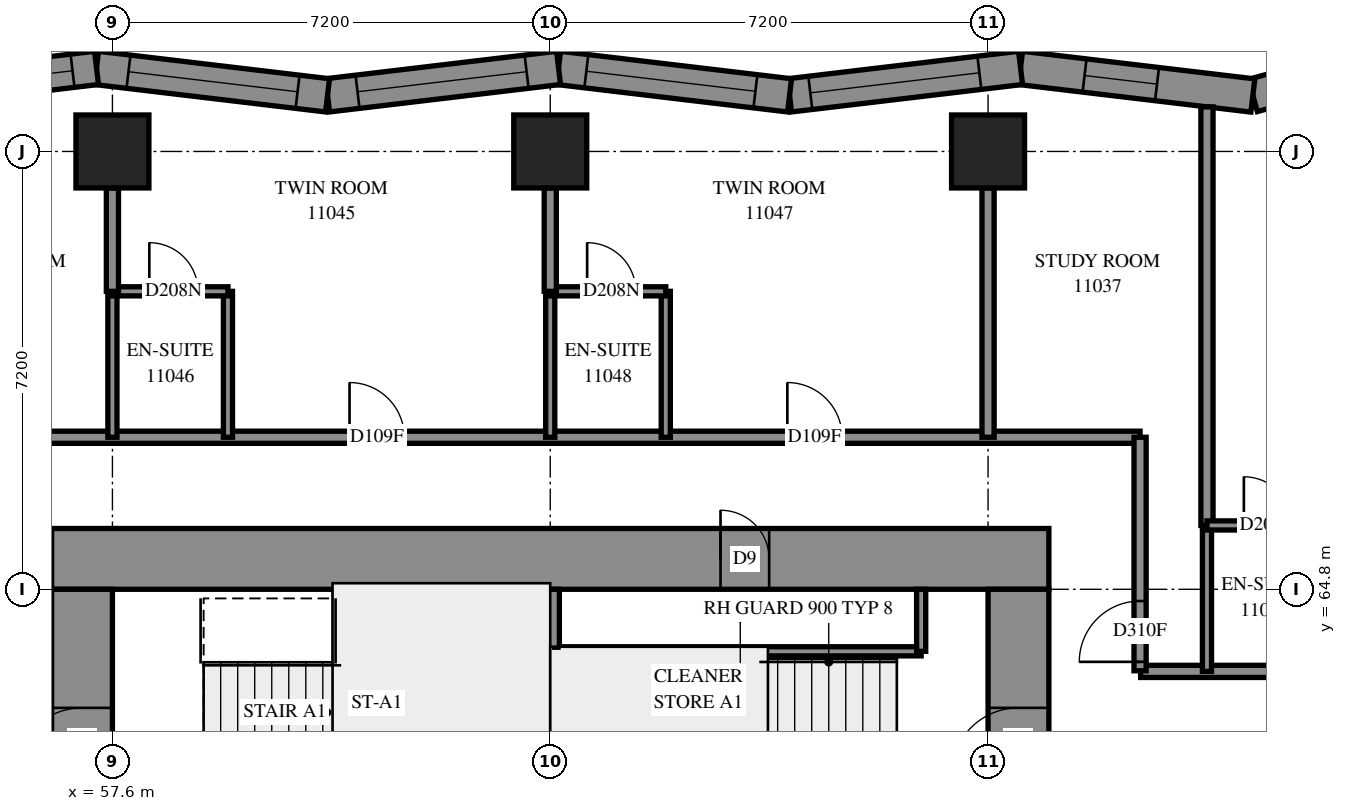
"""IFC4 building model, lengths in metres.
Left out: names, types, materials, properties, quantities, classifications, styles, units other than length and angle.
Written with IfcOpenShell. Run it as: python <this file> out.ifc"""

import sys

from ifc_helpers import new_model, si_unit, direction, frame, frame_2d, origin, origin_2d, place, context, subcontext, project, spatial, polyline, rectangle, outline, extrude, element, fill, save


model = new_model("IFC4")
c1 = context("Model", 3, precision=1e-05, world=origin(), true_north=direction((0.0, 1.0)))
c2 = subcontext(c1, "Body", "Model", "MODEL_VIEW")
j1 = project(units=[si_unit("LENGTHUNIT", "METRE"), si_unit("PLANEANGLEUNIT", "RADIAN")], contexts=[c1])
p1 = place(None, origin())
s1 = spatial("IfcSite", under=j1, at=p1, CompositionType="ELEMENT")
p2 = place(p1, origin())
s2 = spatial("IfcBuilding", under=s1, at=p2, CompositionType="ELEMENT")
p3 = place(p2, frame((0.0, 0.0, 44.0)))
s3 = spatial("IfcBuildingStorey", under=s2, at=p3, CompositionType="ELEMENT", Elevation=44.0)
for number, where, z_axis, x_axis in (
    (1, (57.6, 72.0, 0.0), (0.0, 0.0, 1.0), (1.0, 0.0, 0.0)),
    (2, (64.8, 72.0, 0.0), (0.0, 0.0, 1.0), (1.0, 0.0, 0.0)),
    (3, (72.0, 72.0, 0.0), (0.0, 0.0, 1.0), (1.0, 0.0, 0.0)),
):
    element("IfcColumn", number, at=place(p3, frame(where, z_axis=z_axis, x_axis=x_axis)), inside=s3, PredefinedType="COLUMN", context=c2, shape_type="SweptSolid", body=[
        extrude(rectangle(XDim=1.2, YDim=1.2, at=origin_2d()), origin(), (0.0, 0.0, 1.0), 3.1),
    ])
p4 = place(p3, frame((56.6, 65.3, -0.3), z_axis=(0.0, 0.0, 1.0), x_axis=(1.0, 0.0, 0.0)))
e4 = element("IfcWall", 4, at=p4, inside=s3, PredefinedType="SHEAR", context=c2, shape_type="SweptSolid", body=[
    extrude(rectangle(XDim=16.4, YDim=1.0, at=frame_2d((8.2, 0.0))), origin(), (0.0, 0.0, 1.0), 2.7),
])
p5 = place(p4, frame((11.0, 0.0, 0.3)))
e5 = element("IfcOpeningElement", 5, at=p5, cuts=e4, PredefinedType="OPENING", context=c2, shape_type="SweptSolid", body=[
    extrude(rectangle(XDim=0.8, YDim=2.1, at=frame_2d((0.4, 1.05))), frame((0.0, 0.51, 0.0), z_axis=(0.0, -1.0, 0.0), x_axis=(1.0, 0.0, 0.0)), (0.0, 0.0, 1.0), 1.02),
])
p6 = place(p3, frame((57.1, 50.4, -0.3), z_axis=(0.0, 0.0, 1.0), x_axis=(0.0, 1.0, 0.0)))
e6 = element("IfcWall", 6, at=p6, inside=s3, PredefinedType="SHEAR", context=c2, shape_type="SweptSolid", body=[
    extrude(rectangle(XDim=14.4, YDim=1.0, at=frame_2d((7.2, 0.0))), origin(), (0.0, 0.0, 1.0), 2.7),
])
p7 = place(p6, frame((4.55, 0.0, 0.3)))
e7 = element("IfcOpeningElement", 7, at=p7, cuts=e6, PredefinedType="OPENING", context=c2, shape_type="SweptSolid", body=[
    extrude(rectangle(XDim=1.1, YDim=2.1, at=frame_2d((0.55, 1.05))), frame((0.0, 0.51, 0.0), z_axis=(0.0, -1.0, 0.0), x_axis=(1.0, 0.0, 0.0)), (0.0, 0.0, 1.0), 1.02),
])
p8 = place(p6, frame((11.35, 0.0, 0.3)))
e8 = element("IfcOpeningElement", 8, at=p8, cuts=e6, PredefinedType="OPENING", context=c2, shape_type="SweptSolid", body=[
    extrude(rectangle(XDim=1.1, YDim=2.1, at=frame_2d((0.55, 1.05))), frame((0.0, 0.51, 0.0), z_axis=(0.0, -1.0, 0.0), x_axis=(1.0, 0.0, 0.0)), (0.0, 0.0, 1.0), 1.02),
])
p9 = place(p3, frame((72.5, 50.4, -0.3), z_axis=(0.0, 0.0, 1.0), x_axis=(0.0, 1.0, 0.0)))
e9 = element("IfcWall", 9, at=p9, inside=s3, PredefinedType="SHEAR", context=c2, shape_type="SweptSolid", body=[
    extrude(rectangle(XDim=14.4, YDim=1.0, at=frame_2d((7.2, 0.0))), origin(), (0.0, 0.0, 1.0), 2.7),
])
p10 = place(p9, frame((4.55, 0.0, 0.3)))
e10 = element("IfcOpeningElement", 10, at=p10, cuts=e9, PredefinedType="OPENING", context=c2, shape_type="SweptSolid", body=[
    extrude(rectangle(XDim=1.1, YDim=2.1, at=frame_2d((0.55, 1.05))), frame((0.0, 0.51, 0.0), z_axis=(0.0, -1.0, 0.0), x_axis=(1.0, 0.0, 0.0)), (0.0, 0.0, 1.0), 1.02),
])
p11 = place(p9, frame((11.35, 0.0, 0.3)))
e11 = element("IfcOpeningElement", 11, at=p11, cuts=e9, PredefinedType="OPENING", context=c2, shape_type="SweptSolid", body=[
    extrude(rectangle(XDim=1.1, YDim=2.1, at=frame_2d((0.55, 1.05))), frame((0.0, 0.51, 0.0), z_axis=(0.0, -1.0, 0.0), x_axis=(1.0, 0.0, 0.0)), (0.0, 0.0, 1.0), 1.02),
])
p12 = place(p3, frame((64.8, 60.6, 0.0), z_axis=(0.0, 0.0, 1.0), x_axis=(0.0, 1.0, 0.0)))
e12 = element("IfcWall", 12, at=p12, inside=s3, PredefinedType="SOLIDWALL", context=c2, shape_type="SweptSolid", body=[
    extrude(rectangle(XDim=4.2, YDim=0.3, at=frame_2d((2.1, 0.0))), origin(), (0.0, 0.0, 1.0), 3.1),
])
p13 = place(p3, frame((79.993, 73.927, 0.0), z_axis=(0.0, 0.0, 1.0), x_axis=(-0.9637951892, -0.2666436448, 0.0)))
e13 = element("IfcWall", 13, at=p13, inside=s3, PredefinedType="SOLIDWALL", context=c2, shape_type="SweptSolid", body=[
    extrude(outline(polyline([(-0.221, -0.275), (3.721, -0.275), (3.829, 0.275), (0.221, 0.275), (-0.221, -0.275)])), origin(), (0.0, 0.0, 1.0), 3.1),
])
p14 = place(p13, frame((1.599, 0.0, 0.5)))
e14 = element("IfcOpeningElement", 14, at=p14, cuts=e13, PredefinedType="OPENING", context=c2, shape_type="SweptSolid", body=[
    extrude(rectangle(XDim=1.2, YDim=2.45, at=frame_2d((0.6, 1.225))), frame((0.0, 0.285, 0.0), z_axis=(0.0, -1.0, 0.0), x_axis=(1.0, 0.0, 0.0)), (0.0, 0.0, 1.0), 0.57),
])
p15 = place(p3, frame((76.355, 72.921, 0.0), z_axis=(0.0, 0.0, 1.0), x_axis=(-0.9930244072, 0.1179089763, 0.0)))
e15 = element("IfcWall", 15, at=p15, inside=s3, PredefinedType="SOLIDWALL", context=c2, shape_type="SweptSolid", body=[
    extrude(outline(polyline([(0.054, -0.275), (3.88, -0.275), (3.814, 0.275), (-0.054, 0.275), (0.054, -0.275)])), origin(), (0.0, 0.0, 1.0), 3.1),
])
p16 = place(p15, frame((1.587, 0.0, 0.5)))
e16 = element("IfcOpeningElement", 16, at=p16, cuts=e15, PredefinedType="OPENING", context=c2, shape_type="SweptSolid", body=[
    extrude(rectangle(XDim=1.2, YDim=2.45, at=frame_2d((0.6, 1.225))), frame((0.0, 0.285, 0.0), z_axis=(0.0, -1.0, 0.0), x_axis=(1.0, 0.0, 0.0)), (0.0, 0.0, 1.0), 0.57),
])
p17 = place(p3, frame((72.534, 73.374, 0.0), z_axis=(0.0, 0.0, 1.0), x_axis=(-0.9930269402, -0.1178876415, 0.0)))
e17 = element("IfcWall", 17, at=p17, inside=s3, PredefinedType="SOLIDWALL", context=c2, shape_type="SweptSolid", body=[
    extrude(outline(polyline([(-0.033, -0.275), (3.793, -0.275), (3.858, 0.275), (0.033, 0.275), (-0.033, -0.275)])), origin(), (0.0, 0.0, 1.0), 3.1),
])
p18 = place(p17, frame((0.682, 0.0, 0.5)))
e18 = element("IfcOpeningElement", 18, at=p18, cuts=e17, PredefinedType="OPENING", context=c2, shape_type="SweptSolid", body=[
    extrude(rectangle(XDim=2.8, YDim=2.45, at=frame_2d((1.4, 1.225))), frame((0.0, 0.285, 0.0), z_axis=(0.0, -1.0, 0.0), x_axis=(1.0, 0.0, 0.0)), (0.0, 0.0, 1.0), 0.57),
])
p19 = place(p3, frame((68.736, 72.923, 0.0), z_axis=(0.0, 0.0, 1.0), x_axis=(-0.9930265769, 0.1178907016, 0.0)))
e19 = element("IfcWall", 19, at=p19, inside=s3, PredefinedType="SOLIDWALL", context=c2, shape_type="SweptSolid", body=[
    extrude(outline(polyline([(0.033, -0.275), (3.858, -0.275), (3.793, 0.275), (-0.033, 0.275), (0.033, -0.275)])), origin(), (0.0, 0.0, 1.0), 3.1),
])
p20 = place(p19, frame((0.565, 0.0, 0.5)))
e20 = element("IfcOpeningElement", 20, at=p20, cuts=e19, PredefinedType="OPENING", context=c2, shape_type="SweptSolid", body=[
    extrude(rectangle(XDim=2.8, YDim=2.45, at=frame_2d((1.4, 1.225))), frame((0.0, 0.285, 0.0), z_axis=(0.0, -1.0, 0.0), x_axis=(1.0, 0.0, 0.0)), (0.0, 0.0, 1.0), 0.57),
])
p21 = place(p3, frame((64.937, 73.374, 0.0), z_axis=(0.0, 0.0, 1.0), x_axis=(-0.9930269402, -0.1178876415, 0.0)))
e21 = element("IfcWall", 21, at=p21, inside=s3, PredefinedType="SOLIDWALL", context=c2, shape_type="SweptSolid", body=[
    extrude(outline(polyline([(-0.033, -0.275), (3.793, -0.275), (3.858, 0.275), (0.033, 0.275), (-0.033, -0.275)])), origin(), (0.0, 0.0, 1.0), 3.1),
])
p22 = place(p21, frame((0.529, 0.0, 0.5)))
e22 = element("IfcOpeningElement", 22, at=p22, cuts=e21, PredefinedType="OPENING", context=c2, shape_type="SweptSolid", body=[
    extrude(rectangle(XDim=2.8, YDim=2.45, at=frame_2d((1.4, 1.225))), frame((0.0, 0.285, 0.0), z_axis=(0.0, -1.0, 0.0), x_axis=(1.0, 0.0, 0.0)), (0.0, 0.0, 1.0), 0.57),
])
p23 = place(p3, frame((61.138, 72.923, 0.0), z_axis=(0.0, 0.0, 1.0), x_axis=(-0.9930269402, 0.1178876415, 0.0)))
e23 = element("IfcWall", 23, at=p23, inside=s3, PredefinedType="SOLIDWALL", context=c2, shape_type="SweptSolid", body=[
    extrude(outline(polyline([(0.033, -0.275), (3.858, -0.275), (3.793, 0.275), (-0.033, 0.275), (0.033, -0.275)])), origin(), (0.0, 0.0, 1.0), 3.1),
])
p24 = place(p23, frame((0.496, 0.0, 0.5)))
e24 = element("IfcOpeningElement", 24, at=p24, cuts=e23, PredefinedType="OPENING", context=c2, shape_type="SweptSolid", body=[
    extrude(rectangle(XDim=2.8, YDim=2.45, at=frame_2d((1.4, 1.225))), frame((0.0, 0.285, 0.0), z_axis=(0.0, -1.0, 0.0), x_axis=(1.0, 0.0, 0.0)), (0.0, 0.0, 1.0), 0.57),
])
p25 = place(p3, frame((57.339, 73.374, 0.0), z_axis=(0.0, 0.0, 1.0), x_axis=(-0.9930265769, -0.1178907016, 0.0)))
e25 = element("IfcWall", 25, at=p25, inside=s3, PredefinedType="SOLIDWALL", context=c2, shape_type="SweptSolid", body=[
    extrude(outline(polyline([(-0.033, -0.275), (3.793, -0.275), (3.858, 0.275), (0.033, 0.275), (-0.033, -0.275)])), origin(), (0.0, 0.0, 1.0), 3.1),
])
p26 = place(p25, frame((0.397, 0.0, 0.5)))
e26 = element("IfcOpeningElement", 26, at=p26, cuts=e25, PredefinedType="OPENING", context=c2, shape_type="SweptSolid", body=[
    extrude(rectangle(XDim=2.8, YDim=2.45, at=frame_2d((1.4, 1.225))), frame((0.0, 0.285, 0.0), z_axis=(0.0, -1.0, 0.0), x_axis=(1.0, 0.0, 0.0)), (0.0, 0.0, 1.0), 0.57),
])
p27 = place(p3, frame((64.95, 63.78, 0.0), z_axis=(0.0, 0.0, 1.0), x_axis=(1.0, 0.0, 0.0)))
e27 = element("IfcWall", 27, at=p27, inside=s3, PredefinedType="PARTITIONING", context=c2, shape_type="SweptSolid", body=[
    extrude(rectangle(XDim=5.95, YDim=0.15, at=frame_2d((2.975, 0.0))), origin(), (0.0, 0.0, 1.0), 3.1),
])
p28 = place(p3, frame((70.9, 63.78, 0.0), z_axis=(0.0, 0.0, 1.0), x_axis=(0.0, 1.0, 0.0)))
e28 = element("IfcWall", 28, at=p28, inside=s3, PredefinedType="PARTITIONING", context=c2, shape_type="SweptSolid", body=[
    extrude(rectangle(XDim=1.02, YDim=0.15, at=frame_2d((0.51, 0.0))), origin(), (0.0, 0.0, 1.0), 3.1),
])
p29 = place(p3, frame((55.1, 67.3, 0.0), z_axis=(0.0, 0.0, 1.0), x_axis=(1.0, 0.0, 0.0)))
e29 = element("IfcWall", 29, at=p29, inside=s3, PredefinedType="PARTITIONING", context=c2, shape_type="SweptSolid", body=[
    extrude(rectangle(XDim=19.4, YDim=0.2, at=frame_2d((9.7, 0.0))), origin(), (0.0, 0.0, 1.0), 3.1),
])
p30 = place(p29, frame((6.399, 0.0, 0.0)))
e30 = element("IfcOpeningElement", 30, at=p30, cuts=e29, PredefinedType="OPENING", context=c2, shape_type="SweptSolid", body=[
    extrude(rectangle(XDim=0.9, YDim=2.1, at=frame_2d((0.45, 1.05))), frame((0.0, 0.11, 0.0), z_axis=(0.0, -1.0, 0.0), x_axis=(1.0, 0.0, 0.0)), (0.0, 0.0, 1.0), 0.22),
])
p31 = place(p29, frame((13.599, 0.0, 0.0)))
e31 = element("IfcOpeningElement", 31, at=p31, cuts=e29, PredefinedType="OPENING", context=c2, shape_type="SweptSolid", body=[
    extrude(rectangle(XDim=0.9, YDim=2.1, at=frame_2d((0.45, 1.05))), frame((0.0, 0.11, 0.0), z_axis=(0.0, -1.0, 0.0), x_axis=(1.0, 0.0, 0.0)), (0.0, 0.0, 1.0), 0.22),
])
p32 = place(p3, frame((75.6, 65.85, 0.0), z_axis=(0.0, 0.0, 1.0), x_axis=(0.0, 1.0, 0.0)))
e32 = element("IfcWall", 32, at=p32, inside=s3, PredefinedType="PARTITIONING", context=c2, shape_type="SweptSolid", body=[
    extrude(rectangle(XDim=6.883, YDim=0.2, at=frame_2d((3.442, 0.0))), origin(), (0.0, 0.0, 1.0), 3.1),
])
p33 = place(p3, frame((74.51, 63.45, 0.0), z_axis=(0.0, 0.0, 1.0), x_axis=(1.0, 0.0, 0.0)))
e33 = element("IfcWall", 33, at=p33, inside=s3, PredefinedType="PARTITIONING", context=c2, shape_type="SweptSolid", body=[
    extrude(rectangle(XDim=4.69, YDim=0.2, at=frame_2d((2.345, 0.0))), origin(), (0.0, 0.0, 1.0), 3.1),
])
p34 = place(p33, frame((3.12, 0.0, 0.0)))
e34 = element("IfcOpeningElement", 34, at=p34, cuts=e33, PredefinedType="OPENING", context=c2, shape_type="SweptSolid", body=[
    extrude(rectangle(XDim=0.9, YDim=2.1, at=frame_2d((0.45, 1.05))), frame((0.0, 0.11, 0.0), z_axis=(0.0, -1.0, 0.0), x_axis=(1.0, 0.0, 0.0)), (0.0, 0.0, 1.0), 0.22),
])
p35 = place(p3, frame((72.0, 67.3, 0.0), z_axis=(0.0, 0.0, 1.0), x_axis=(0.0, 1.0, 0.0)))
e35 = element("IfcWall", 35, at=p35, inside=s3, PredefinedType="PARTITIONING", context=c2, shape_type="SweptSolid", body=[
    extrude(rectangle(XDim=4.1, YDim=0.2, at=frame_2d((2.05, 0.0))), origin(), (0.0, 0.0, 1.0), 3.1),
])
p36 = place(p3, frame((74.5, 63.46, 0.0), z_axis=(0.0, 0.0, 1.0), x_axis=(0.0, 1.0, 0.0)))
e36 = element("IfcWall", 36, at=p36, inside=s3, PredefinedType="PARTITIONING", context=c2, shape_type="SweptSolid", body=[
    extrude(rectangle(XDim=3.84, YDim=0.2, at=frame_2d((1.92, 0.0))), origin(), (0.0, 0.0, 1.0), 3.1),
])
p37 = place(p36, frame((0.147, 0.0, 0.0)))
e37 = element("IfcOpeningElement", 37, at=p37, cuts=e36, PredefinedType="OPENING", context=c2, shape_type="SweptSolid", body=[
    extrude(rectangle(XDim=1.0, YDim=2.1, at=frame_2d((0.5, 1.05))), frame((0.0, 0.11, 0.0), z_axis=(0.0, -1.0, 0.0), x_axis=(1.0, 0.0, 0.0)), (0.0, 0.0, 1.0), 0.22),
])
for number, where, z_axis, x_axis in (
    (38, (59.5, 67.3, 0.0), (0.0, 0.0, 1.0), (0.0, 1.0, 0.0)),
    (39, (57.6, 67.3, 0.0), (0.0, 0.0, 1.0), (0.0, 1.0, 0.0)),
    (40, (66.7, 67.3, 0.0), (0.0, 0.0, 1.0), (0.0, 1.0, 0.0)),
    (41, (64.8, 67.3, 0.0), (0.0, 0.0, 1.0), (0.0, 1.0, 0.0)),
    (42, (75.6, 63.45, 0.0), (0.0, 0.0, 1.0), (0.0, 1.0, 0.0)),
):
    element("IfcWall", number, at=place(p3, frame(where, z_axis=z_axis, x_axis=x_axis)), inside=s3, PredefinedType="PARTITIONING", context=c2, shape_type="SweptSolid", body=[
        extrude(rectangle(XDim=2.4, YDim=0.15, at=frame_2d((1.2, 0.0))), origin(), (0.0, 0.0, 1.0), 3.1),
    ])
p38 = place(p3, frame((75.6, 65.85, 0.0), z_axis=(0.0, 0.0, 1.0), x_axis=(1.0, 0.0, 0.0)))
e43 = element("IfcWall", 43, at=p38, inside=s3, PredefinedType="PARTITIONING", context=c2, shape_type="SweptSolid", body=[
    extrude(rectangle(XDim=1.9, YDim=0.15, at=frame_2d((0.95, 0.0))), origin(), (0.0, 0.0, 1.0), 3.1),
])
p39 = place(p38, frame((0.607, 0.0, 0.0)))
e44 = element("IfcOpeningElement", 44, at=p39, cuts=e43, PredefinedType="OPENING", context=c2, shape_type="SweptSolid", body=[
    extrude(rectangle(XDim=0.8, YDim=2.1, at=frame_2d((0.4, 1.05))), frame((0.0, 0.085, 0.0), z_axis=(0.0, -1.0, 0.0), x_axis=(1.0, 0.0, 0.0)), (0.0, 0.0, 1.0), 0.17),
])
p40 = place(p3, frame((64.8, 69.7, 0.0), z_axis=(0.0, 0.0, 1.0), x_axis=(1.0, 0.0, 0.0)))
e45 = element("IfcWall", 45, at=p40, inside=s3, PredefinedType="PARTITIONING", context=c2, shape_type="SweptSolid", body=[
    extrude(rectangle(XDim=1.9, YDim=0.15, at=frame_2d((0.95, 0.0))), origin(), (0.0, 0.0, 1.0), 3.1),
])
p41 = place(p40, frame((0.607, 0.0, 0.0)))
e46 = element("IfcOpeningElement", 46, at=p41, cuts=e45, PredefinedType="OPENING", context=c2, shape_type="SweptSolid", body=[
    extrude(rectangle(XDim=0.8, YDim=2.1, at=frame_2d((0.4, 1.05))), frame((0.0, 0.085, 0.0), z_axis=(0.0, -1.0, 0.0), x_axis=(1.0, 0.0, 0.0)), (0.0, 0.0, 1.0), 0.17),
])
p42 = place(p3, frame((57.6, 69.7, 0.0), z_axis=(0.0, 0.0, 1.0), x_axis=(1.0, 0.0, 0.0)))
e47 = element("IfcWall", 47, at=p42, inside=s3, PredefinedType="PARTITIONING", context=c2, shape_type="SweptSolid", body=[
    extrude(rectangle(XDim=1.9, YDim=0.15, at=frame_2d((0.95, 0.0))), origin(), (0.0, 0.0, 1.0), 3.1),
])
p43 = place(p42, frame((0.607, 0.0, 0.0)))
e48 = element("IfcOpeningElement", 48, at=p43, cuts=e47, PredefinedType="OPENING", context=c2, shape_type="SweptSolid", body=[
    extrude(rectangle(XDim=0.8, YDim=2.1, at=frame_2d((0.4, 1.05))), frame((0.0, 0.085, 0.0), z_axis=(0.0, -1.0, 0.0), x_axis=(1.0, 0.0, 0.0)), (0.0, 0.0, 1.0), 0.17),
])
for number, where, z_axis, x_axis in (
    (49, (57.6, 69.7, 0.0), (0.0, 0.0, 1.0), (0.0, 1.0, 0.0)),
    (50, (64.8, 69.7, 0.0), (0.0, 0.0, 1.0), (0.0, 1.0, 0.0)),
):
    element("IfcWall", number, at=place(p3, frame(where, z_axis=z_axis, x_axis=x_axis)), inside=s3, PredefinedType="PARTITIONING", context=c2, shape_type="SweptSolid", body=[
        extrude(rectangle(XDim=1.7, YDim=0.2, at=frame_2d((0.85, 0.0))), origin(), (0.0, 0.0, 1.0), 3.1),
    ])
p44 = place(p16, origin())
e51 = element("IfcWindow", 51, at=p44, inside=s3, PartitioningType="SINGLE_PANEL", PredefinedType="WINDOW", context=c2, shape_type="SweptSolid", body=[
    extrude(rectangle(XDim=1.2, YDim=2.45, at=frame_2d((0.6, 1.225))), frame((0.0, 0.155, 0.0), z_axis=(0.0, -1.0, 0.0), x_axis=(1.0, 0.0, 0.0)), (0.0, 0.0, 1.0), 0.06),
])
fill(e16, e51)
p45 = place(p18, origin())
e52 = element("IfcWindow", 52, at=p45, inside=s3, PartitioningType="SINGLE_PANEL", PredefinedType="WINDOW", context=c2, shape_type="SweptSolid", body=[
    extrude(rectangle(XDim=2.8, YDim=2.45, at=frame_2d((1.4, 1.225))), frame((0.0, 0.155, 0.0), z_axis=(0.0, -1.0, 0.0), x_axis=(1.0, 0.0, 0.0)), (0.0, 0.0, 1.0), 0.06),
])
fill(e18, e52)
p46 = place(p20, origin())
e53 = element("IfcWindow", 53, at=p46, inside=s3, PartitioningType="SINGLE_PANEL", PredefinedType="WINDOW", context=c2, shape_type="SweptSolid", body=[
    extrude(rectangle(XDim=2.8, YDim=2.45, at=frame_2d((1.4, 1.225))), frame((0.0, 0.155, 0.0), z_axis=(0.0, -1.0, 0.0), x_axis=(1.0, 0.0, 0.0)), (0.0, 0.0, 1.0), 0.06),
])
fill(e20, e53)
p47 = place(p22, origin())
e54 = element("IfcWindow", 54, at=p47, inside=s3, PartitioningType="SINGLE_PANEL", PredefinedType="WINDOW", context=c2, shape_type="SweptSolid", body=[
    extrude(rectangle(XDim=2.8, YDim=2.45, at=frame_2d((1.4, 1.225))), frame((0.0, 0.155, 0.0), z_axis=(0.0, -1.0, 0.0), x_axis=(1.0, 0.0, 0.0)), (0.0, 0.0, 1.0), 0.06),
])
fill(e22, e54)
p48 = place(p24, origin())
e55 = element("IfcWindow", 55, at=p48, inside=s3, PartitioningType="SINGLE_PANEL", PredefinedType="WINDOW", context=c2, shape_type="SweptSolid", body=[
    extrude(rectangle(XDim=2.8, YDim=2.45, at=frame_2d((1.4, 1.225))), frame((0.0, 0.155, 0.0), z_axis=(0.0, -1.0, 0.0), x_axis=(1.0, 0.0, 0.0)), (0.0, 0.0, 1.0), 0.06),
])
fill(e24, e55)
p49 = place(p26, origin())
e56 = element("IfcWindow", 56, at=p49, inside=s3, PartitioningType="SINGLE_PANEL", PredefinedType="WINDOW", context=c2, shape_type="SweptSolid", body=[
    extrude(rectangle(XDim=2.8, YDim=2.45, at=frame_2d((1.4, 1.225))), frame((0.0, 0.155, 0.0), z_axis=(0.0, -1.0, 0.0), x_axis=(1.0, 0.0, 0.0)), (0.0, 0.0, 1.0), 0.06),
])
fill(e26, e56)
p50 = place(p5, origin())
e57 = element("IfcDoor", 57, at=p50, inside=s3, OperationType="SINGLE_SWING_RIGHT", PredefinedType="DOOR", context=c2, shape_type="SweptSolid", body=[
    extrude(rectangle(XDim=0.8, YDim=2.1, at=frame_2d((0.4, 1.05))), frame((0.0, -0.44, 0.0), z_axis=(0.0, -1.0, 0.0), x_axis=(1.0, 0.0, 0.0)), (0.0, 0.0, 1.0), 0.05),
])
fill(e5, e57)
p51 = place(p8, origin())
e58 = element("IfcDoor", 58, at=p51, inside=s3, OperationType="SINGLE_SWING_LEFT", PredefinedType="DOOR", context=c2, shape_type="SweptSolid", body=[
    extrude(rectangle(XDim=1.1, YDim=2.1, at=frame_2d((0.55, 1.05))), frame((0.0, 0.025, 0.0), z_axis=(0.0, -1.0, 0.0), x_axis=(1.0, 0.0, 0.0)), (0.0, 0.0, 1.0), 0.05),
])
fill(e8, e58)
p52 = place(p11, origin())
e59 = element("IfcDoor", 59, at=p52, inside=s3, OperationType="SINGLE_SWING_RIGHT", PredefinedType="DOOR", context=c2, shape_type="SweptSolid", body=[
    extrude(rectangle(XDim=1.1, YDim=2.1, at=frame_2d((0.55, 1.05))), frame((0.0, 0.025, 0.0), z_axis=(0.0, -1.0, 0.0), x_axis=(1.0, 0.0, 0.0)), (0.0, 0.0, 1.0), 0.05),
])
fill(e11, e59)
p53 = place(p37, origin())
e60 = element("IfcDoor", 60, at=p53, inside=s3, OperationType="SINGLE_SWING_RIGHT", PredefinedType="DOOR", context=c2, shape_type="SweptSolid", body=[
    extrude(rectangle(XDim=1.0, YDim=2.1, at=frame_2d((0.5, 1.05))), frame((0.0, 0.025, 0.0), z_axis=(0.0, -1.0, 0.0), x_axis=(1.0, 0.0, 0.0)), (0.0, 0.0, 1.0), 0.05),
])
fill(e37, e60)
p54 = place(p39, origin())
e61 = element("IfcDoor", 61, at=p54, inside=s3, OperationType="SINGLE_SWING_RIGHT", PredefinedType="DOOR", context=c2, shape_type="SweptSolid", body=[
    extrude(rectangle(XDim=0.8, YDim=2.1, at=frame_2d((0.4, 1.05))), frame((0.0, 0.025, 0.0), z_axis=(0.0, -1.0, 0.0), x_axis=(1.0, 0.0, 0.0)), (0.0, 0.0, 1.0), 0.05),
])
fill(e44, e61)
p55 = place(p30, origin())
e62 = element("IfcDoor", 62, at=p55, inside=s3, OperationType="SINGLE_SWING_RIGHT", PredefinedType="DOOR", context=c2, shape_type="SweptSolid", body=[
    extrude(rectangle(XDim=0.9, YDim=2.1, at=frame_2d((0.45, 1.05))), frame((0.0, 0.025, 0.0), z_axis=(0.0, -1.0, 0.0), x_axis=(1.0, 0.0, 0.0)), (0.0, 0.0, 1.0), 0.05),
])
fill(e30, e62)
p56 = place(p43, origin())
e63 = element("IfcDoor", 63, at=p56, inside=s3, OperationType="SINGLE_SWING_RIGHT", PredefinedType="DOOR", context=c2, shape_type="SweptSolid", body=[
    extrude(rectangle(XDim=0.8, YDim=2.1, at=frame_2d((0.4, 1.05))), frame((0.0, 0.025, 0.0), z_axis=(0.0, -1.0, 0.0), x_axis=(1.0, 0.0, 0.0)), (0.0, 0.0, 1.0), 0.05),
])
fill(e48, e63)
p57 = place(p31, origin())
e64 = element("IfcDoor", 64, at=p57, inside=s3, OperationType="SINGLE_SWING_RIGHT", PredefinedType="DOOR", context=c2, shape_type="SweptSolid", body=[
    extrude(rectangle(XDim=0.9, YDim=2.1, at=frame_2d((0.45, 1.05))), frame((0.0, 0.025, 0.0), z_axis=(0.0, -1.0, 0.0), x_axis=(1.0, 0.0, 0.0)), (0.0, 0.0, 1.0), 0.05),
])
fill(e31, e64)
p58 = place(p41, origin())
e65 = element("IfcDoor", 65, at=p58, inside=s3, OperationType="SINGLE_SWING_RIGHT", PredefinedType="DOOR", context=c2, shape_type="SweptSolid", body=[
    extrude(rectangle(XDim=0.8, YDim=2.1, at=frame_2d((0.4, 1.05))), frame((0.0, 0.025, 0.0), z_axis=(0.0, -1.0, 0.0), x_axis=(1.0, 0.0, 0.0)), (0.0, 0.0, 1.0), 0.05),
])
fill(e46, e65)
save(model, sys.argv[1])
